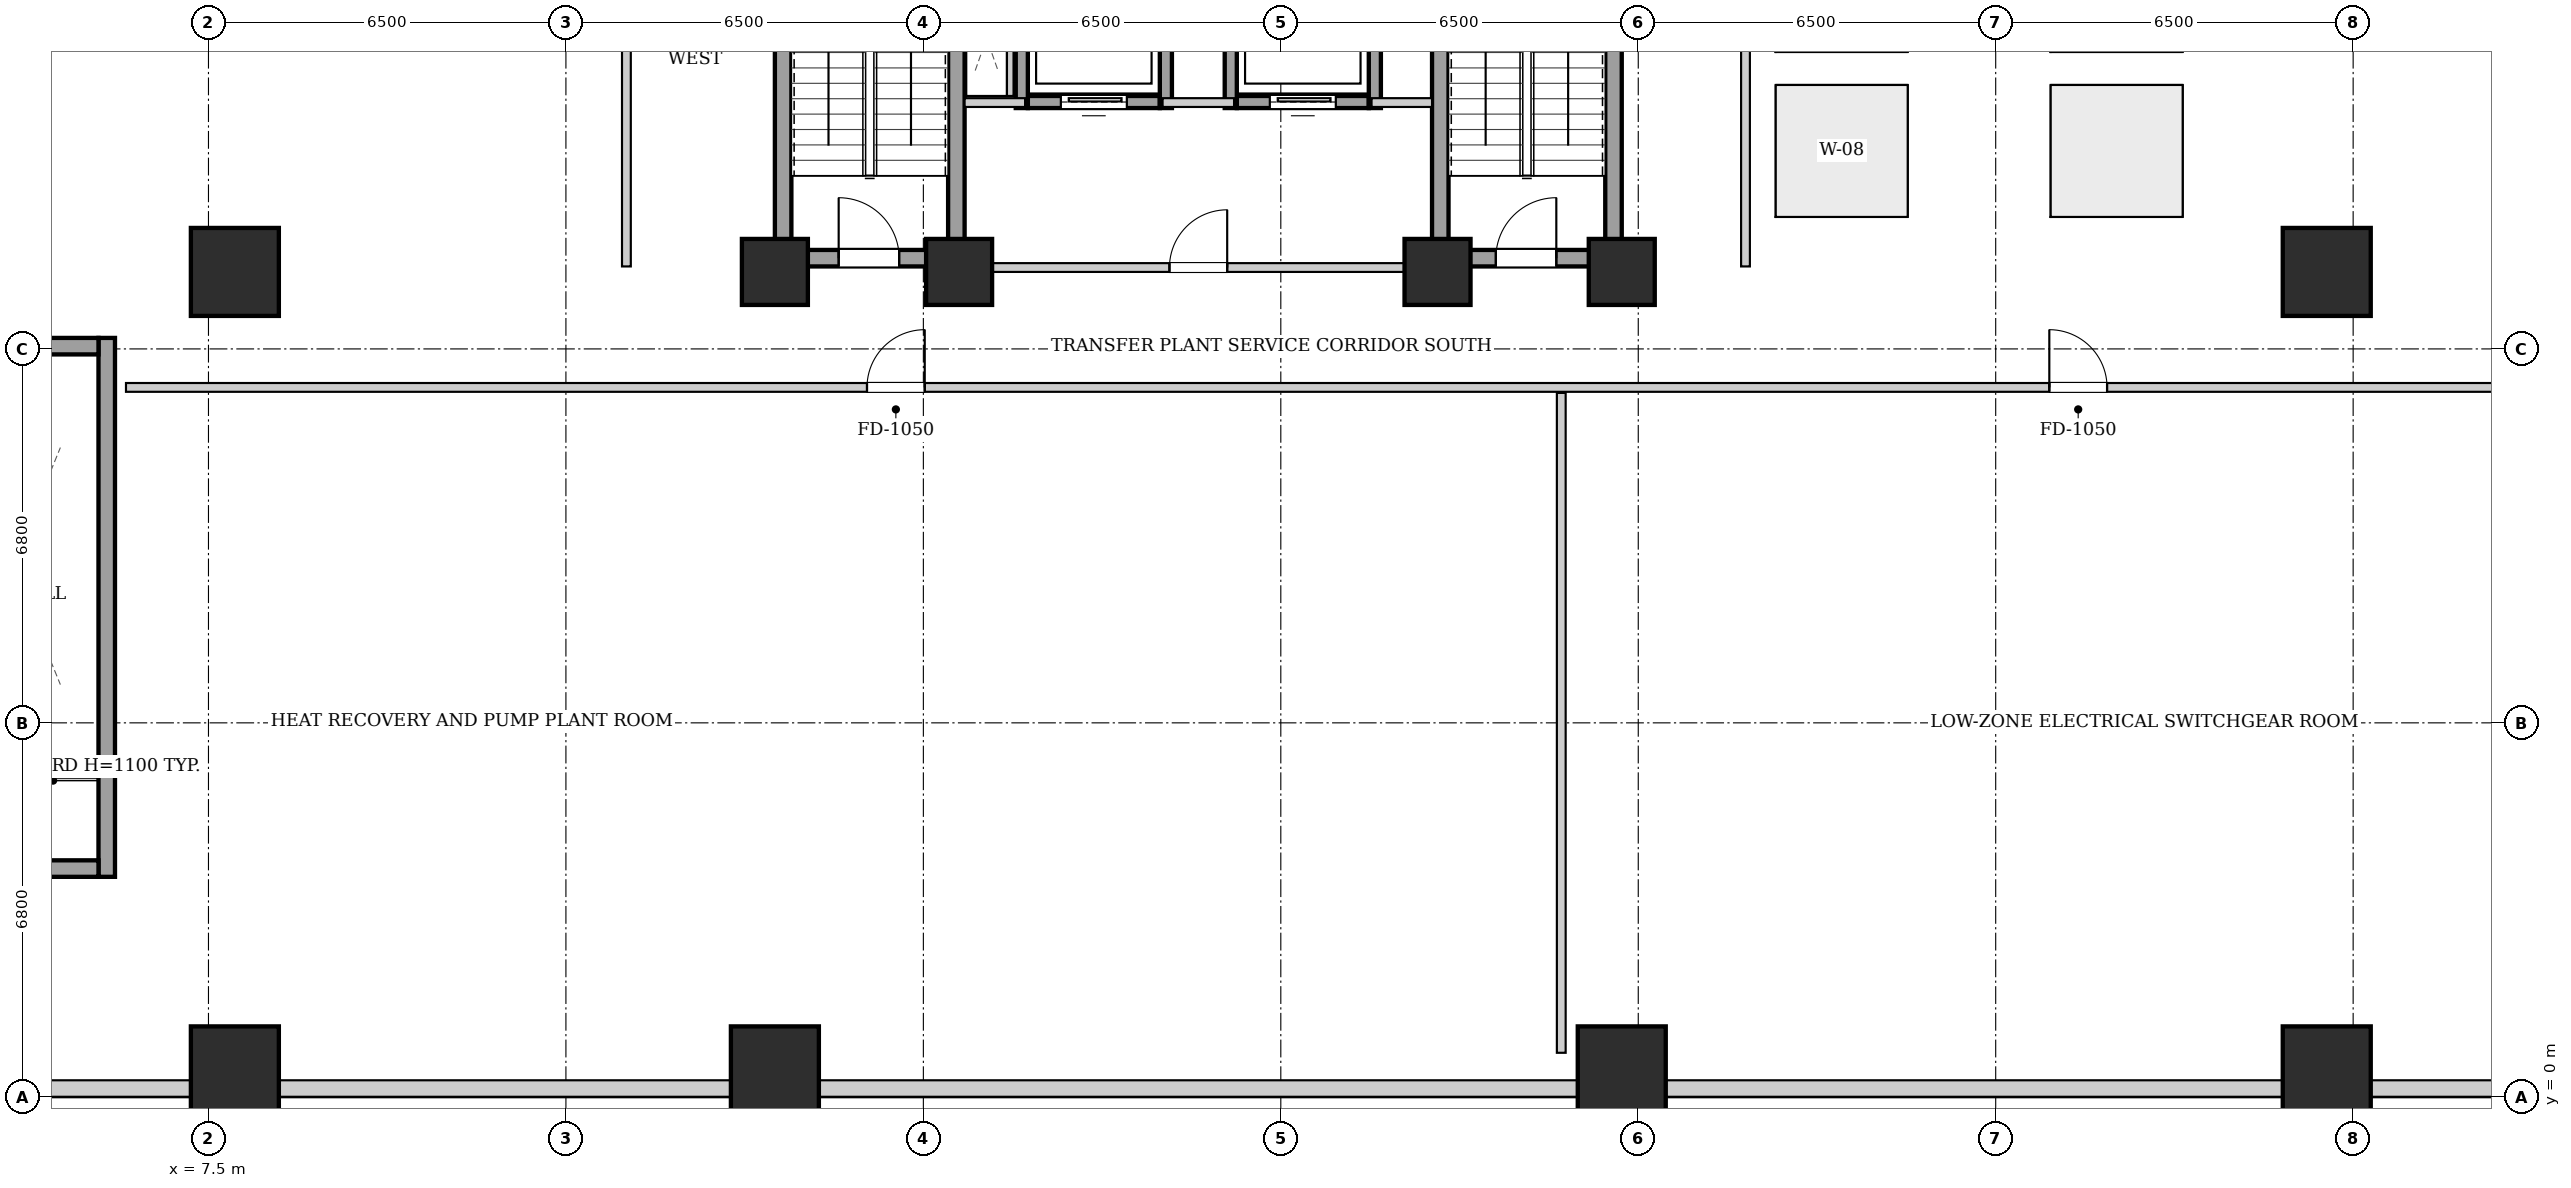
"""IFC4 building model, lengths in metres.
Left out: names, types, materials, properties, quantities, classifications, styles, units other than length and angle.
Written with IfcOpenShell. Run it as: python <this file> out.ifc"""

import sys

from ifc_helpers import new_model, si_unit, direction, frame, frame_2d, origin, origin_2d, place, context, subcontext, project, spatial, rectangle, extrude, element, fill, save


model = new_model("IFC4")
c1 = context("Model", 3, precision=1e-05, world=origin(), true_north=direction((0.0, 1.0)))
c2 = subcontext(c1, "Body", "Model", "MODEL_VIEW")
j1 = project(units=[si_unit("LENGTHUNIT", "METRE"), si_unit("PLANEANGLEUNIT", "RADIAN")], contexts=[c1])
p1 = place(None, origin())
s1 = spatial("IfcSite", under=j1, at=p1, CompositionType="ELEMENT")
p2 = place(p1, origin())
s2 = spatial("IfcBuilding", under=s1, at=p2, CompositionType="ELEMENT")
p3 = place(p2, frame((0.0, 0.0, 20.8)))
s3 = spatial("IfcBuildingStorey", under=s2, at=p3, CompositionType="ELEMENT", Elevation=20.8)
for number, where, z_axis, x_axis in (
    (1, (7.98, 0.48, 0.0), (0.0, 0.0, 1.0), (1.0, 0.0, 0.0)),
    (2, (7.98, 15.0, 0.0), (0.0, 0.0, 1.0), (1.0, 0.0, 0.0)),
    (3, (46.02, 0.48, 0.0), (0.0, 0.0, 1.0), (1.0, 0.0, 0.0)),
    (4, (46.02, 15.0, 0.0), (0.0, 0.0, 1.0), (1.0, 0.0, 0.0)),
    (5, (17.8, 0.48, 0.0), (0.0, 0.0, 1.0), (1.0, 0.0, 0.0)),
    (6, (33.2, 0.48, 0.0), (0.0, 0.0, 1.0), (1.0, 0.0, 0.0)),
):
    element("IfcColumn", number, at=place(p3, frame(where, z_axis=z_axis, x_axis=x_axis)), inside=s3, PredefinedType="COLUMN", context=c2, shape_type="SweptSolid", body=[
        extrude(rectangle(XDim=1.6, YDim=1.6, at=origin_2d()), origin(), (0.0, 0.0, 1.0), 5.0),
    ])
for number, where, z_axis, x_axis in (
    (7, (17.8, 15.0, 0.0), (0.0, 0.0, 1.0), (1.0, 0.0, 0.0)),
    (8, (21.15, 15.0, 0.0), (0.0, 0.0, 1.0), (1.0, 0.0, 0.0)),
    (9, (29.85, 15.0, 0.0), (0.0, 0.0, 1.0), (1.0, 0.0, 0.0)),
    (10, (33.2, 15.0, 0.0), (0.0, 0.0, 1.0), (1.0, 0.0, 0.0)),
):
    element("IfcColumn", number, at=place(p3, frame(where, z_axis=z_axis, x_axis=x_axis)), inside=s3, PredefinedType="COLUMN", context=c2, shape_type="SweptSolid", body=[
        extrude(rectangle(XDim=1.2, YDim=1.2, at=origin_2d()), origin(), (0.0, 0.0, 1.0), 5.0),
    ])
p4 = place(p3, frame((53.84, 0.15, 0.0), z_axis=(0.0, 0.0, 1.0), x_axis=(-1.0, 0.0, 0.0)))
e11 = element("IfcWall", 11, at=p4, inside=s3, PredefinedType="SOLIDWALL", context=c2, shape_type="SweptSolid", body=[
    extrude(rectangle(XDim=53.68, YDim=0.3, at=frame_2d((26.84, 0.0))), origin(), (0.0, 0.0, 1.0), 2.525),
])
for number, where, z_axis, x_axis in (
    (12, (17.95, 15.1, 0.0), (0.0, 0.0, 1.0), (0.0, 1.0, 0.0)),
    (13, (21.1, 15.1, 0.0), (0.0, 0.0, 1.0), (0.0, 1.0, 0.0)),
):
    element("IfcWall", number, at=place(p3, frame(where, z_axis=z_axis, x_axis=x_axis)), inside=s3, PredefinedType="SHEAR", context=c2, shape_type="SweptSolid", body=[
        extrude(rectangle(XDim=9.0, YDim=0.3, at=frame_2d((4.5, 0.0))), origin(), (0.0, 0.0, 1.0), 4.74),
    ])
p5 = place(p3, frame((18.1, 15.25, 0.0), z_axis=(0.0, 0.0, 1.0), x_axis=(1.0, 0.0, 0.0)))
e14 = element("IfcWall", 14, at=p5, inside=s3, PredefinedType="SHEAR", context=c2, shape_type="SweptSolid", body=[
    extrude(rectangle(XDim=2.85, YDim=0.3, at=frame_2d((1.425, 0.0))), origin(), (0.0, 0.0, 1.0), 4.74),
])
p6 = place(p5, frame((0.86, 0.0, 0.0)))
e15 = element("IfcOpeningElement", 15, at=p6, cuts=e14, PredefinedType="OPENING", context=c2, shape_type="SweptSolid", body=[
    extrude(rectangle(XDim=1.1, YDim=2.05, at=frame_2d((0.55, 1.025))), frame((0.0, 0.16, 0.0), z_axis=(0.0, -1.0, 0.0), x_axis=(1.0, 0.0, 0.0)), (0.0, 0.0, 1.0), 0.32),
])
for number, where, z_axis, x_axis in (
    (16, (29.9, 15.1, 0.0), (0.0, 0.0, 1.0), (0.0, 1.0, 0.0)),
    (17, (33.05, 15.1, 0.0), (0.0, 0.0, 1.0), (0.0, 1.0, 0.0)),
):
    element("IfcWall", number, at=place(p3, frame(where, z_axis=z_axis, x_axis=x_axis)), inside=s3, PredefinedType="SHEAR", context=c2, shape_type="SweptSolid", body=[
        extrude(rectangle(XDim=9.0, YDim=0.3, at=frame_2d((4.5, 0.0))), origin(), (0.0, 0.0, 1.0), 4.74),
    ])
p7 = place(p3, frame((30.05, 15.25, 0.0), z_axis=(0.0, 0.0, 1.0), x_axis=(1.0, 0.0, 0.0)))
e18 = element("IfcWall", 18, at=p7, inside=s3, PredefinedType="SHEAR", context=c2, shape_type="SweptSolid", body=[
    extrude(rectangle(XDim=2.85, YDim=0.3, at=frame_2d((1.425, 0.0))), origin(), (0.0, 0.0, 1.0), 4.74),
])
p8 = place(p7, frame((0.86, 0.0, 0.0)))
e19 = element("IfcOpeningElement", 19, at=p8, cuts=e18, PredefinedType="OPENING", context=c2, shape_type="SweptSolid", body=[
    extrude(rectangle(XDim=1.1, YDim=2.05, at=frame_2d((0.55, 1.025))), frame((0.0, 0.16, 0.0), z_axis=(0.0, -1.0, 0.0), x_axis=(1.0, 0.0, 0.0)), (0.0, 0.0, 1.0), 0.32),
])
p9 = place(p3, frame((5.65, 4.0, 0.0), z_axis=(0.0, 0.0, 1.0), x_axis=(0.0, 1.0, 0.0)))
e20 = element("IfcWall", 20, at=p9, inside=s3, PredefinedType="SHEAR", context=c2, shape_type="SweptSolid", body=[
    extrude(rectangle(XDim=9.8, YDim=0.3, at=frame_2d((4.9, 0.0))), origin(), (0.0, 0.0, 1.0), 4.74),
])
p10 = place(p3, frame((2.35, 13.65, 0.0), z_axis=(0.0, 0.0, 1.0), x_axis=(1.0, 0.0, 0.0)))
e21 = element("IfcWall", 21, at=p10, inside=s3, PredefinedType="SHEAR", context=c2, shape_type="SweptSolid", body=[
    extrude(rectangle(XDim=3.15, YDim=0.3, at=frame_2d((1.575, 0.0))), origin(), (0.0, 0.0, 1.0), 4.74),
])
p11 = place(p3, frame((2.35, 4.15, 0.0), z_axis=(0.0, 0.0, 1.0), x_axis=(1.0, 0.0, 0.0)))
e22 = element("IfcWall", 22, at=p11, inside=s3, PredefinedType="SHEAR", context=c2, shape_type="SweptSolid", body=[
    extrude(rectangle(XDim=3.15, YDim=0.3, at=frame_2d((1.575, 0.0))), origin(), (0.0, 0.0, 1.0), 4.74),
])
p12 = place(p11, frame((1.02, 0.0, 0.0)))
e23 = element("IfcOpeningElement", 23, at=p12, cuts=e22, PredefinedType="OPENING", context=c2, shape_type="SweptSolid", body=[
    extrude(rectangle(XDim=1.1, YDim=2.05, at=frame_2d((0.55, 1.025))), frame((0.0, 0.16, 0.0), z_axis=(0.0, -1.0, 0.0), x_axis=(1.0, 0.0, 0.0)), (0.0, 0.0, 1.0), 0.32),
])
p13 = place(p3, frame((22.4, 18.09, 0.0), z_axis=(0.0, 0.0, 1.0), x_axis=(1.0, 0.0, 0.0)))
e24 = element("IfcWall", 24, at=p13, inside=s3, PredefinedType="SHEAR", context=c2, shape_type="SweptSolid", body=[
    extrude(rectangle(XDim=2.4, YDim=0.22, at=frame_2d((1.2, 0.0))), origin(), (0.0, 0.0, 1.0), 4.74),
])
p14 = place(p13, frame((0.6, 0.0, 0.0)))
e25 = element("IfcOpeningElement", 25, at=p14, cuts=e24, PredefinedType="OPENING", context=c2, shape_type="SweptSolid", body=[
    extrude(rectangle(XDim=1.2, YDim=2.15, at=frame_2d((0.6, 1.075))), frame((0.0, 0.12, 0.0), z_axis=(0.0, -1.0, 0.0), x_axis=(1.0, 0.0, 0.0)), (0.0, 0.0, 1.0), 0.24),
])
for number, where, z_axis, x_axis in (
    (26, (22.29, 17.98, 0.0), (0.0, 0.0, 1.0), (0.0, 1.0, 0.0)),
    (27, (24.91, 17.98, 0.0), (0.0, 0.0, 1.0), (0.0, 1.0, 0.0)),
):
    element("IfcWall", number, at=place(p3, frame(where, z_axis=z_axis, x_axis=x_axis)), inside=s3, PredefinedType="SHEAR", context=c2, shape_type="SweptSolid", body=[
        extrude(rectangle(XDim=2.54, YDim=0.22, at=frame_2d((1.27, 0.0))), origin(), (0.0, 0.0, 1.0), 4.74),
    ])
p15 = place(p3, frame((26.2, 18.09, 0.0), z_axis=(0.0, 0.0, 1.0), x_axis=(1.0, 0.0, 0.0)))
e28 = element("IfcWall", 28, at=p15, inside=s3, PredefinedType="SHEAR", context=c2, shape_type="SweptSolid", body=[
    extrude(rectangle(XDim=2.4, YDim=0.22, at=frame_2d((1.2, 0.0))), origin(), (0.0, 0.0, 1.0), 4.74),
])
p16 = place(p15, frame((0.6, 0.0, 0.0)))
e29 = element("IfcOpeningElement", 29, at=p16, cuts=e28, PredefinedType="OPENING", context=c2, shape_type="SweptSolid", body=[
    extrude(rectangle(XDim=1.2, YDim=2.15, at=frame_2d((0.6, 1.075))), frame((0.0, 0.12, 0.0), z_axis=(0.0, -1.0, 0.0), x_axis=(1.0, 0.0, 0.0)), (0.0, 0.0, 1.0), 0.24),
])
for number, where, z_axis, x_axis in (
    (30, (26.09, 17.98, 0.0), (0.0, 0.0, 1.0), (0.0, 1.0, 0.0)),
    (31, (28.71, 17.98, 0.0), (0.0, 0.0, 1.0), (0.0, 1.0, 0.0)),
):
    element("IfcWall", number, at=place(p3, frame(where, z_axis=z_axis, x_axis=x_axis)), inside=s3, PredefinedType="SHEAR", context=c2, shape_type="SweptSolid", body=[
        extrude(rectangle(XDim=2.54, YDim=0.22, at=frame_2d((1.27, 0.0))), origin(), (0.0, 0.0, 1.0), 4.74),
    ])
p17 = place(p3, frame((21.25, 15.08, 0.0), z_axis=(0.0, 0.0, 1.0), x_axis=(1.0, 0.0, 0.0)))
e32 = element("IfcWall", 32, at=p17, inside=s3, PredefinedType="PARTITIONING", context=c2, shape_type="SweptSolid", body=[
    extrude(rectangle(XDim=8.5, YDim=0.16, at=frame_2d((4.25, 0.0))), origin(), (0.0, 0.0, 1.0), 4.74),
])
p18 = place(p17, frame((3.725, 0.0, 0.0)))
e33 = element("IfcOpeningElement", 33, at=p18, cuts=e32, PredefinedType="OPENING", context=c2, shape_type="SweptSolid", body=[
    extrude(rectangle(XDim=1.05, YDim=2.05, at=frame_2d((0.525, 1.025))), frame((0.0, 0.09, 0.0), z_axis=(0.0, -1.0, 0.0), x_axis=(1.0, 0.0, 0.0)), (0.0, 0.0, 1.0), 0.18),
])
p19 = place(p3, frame((21.25, 18.08, 0.0), z_axis=(0.0, 0.0, 1.0), x_axis=(1.0, 0.0, 0.0)))
e34 = element("IfcWall", 34, at=p19, inside=s3, PredefinedType="PARTITIONING", context=c2, shape_type="SweptSolid", body=[
    extrude(rectangle(XDim=1.1, YDim=0.16, at=frame_2d((0.55, 0.0))), origin(), (0.0, 0.0, 1.0), 4.74),
])
p20 = place(p3, frame((24.85, 18.08, 0.0), z_axis=(0.0, 0.0, 1.0), x_axis=(1.0, 0.0, 0.0)))
e35 = element("IfcWall", 35, at=p20, inside=s3, PredefinedType="PARTITIONING", context=c2, shape_type="SweptSolid", body=[
    extrude(rectangle(XDim=1.3, YDim=0.16, at=frame_2d((0.65, 0.0))), origin(), (0.0, 0.0, 1.0), 4.74),
])
p21 = place(p3, frame((28.65, 18.08, 0.0), z_axis=(0.0, 0.0, 1.0), x_axis=(1.0, 0.0, 0.0)))
e36 = element("IfcWall", 36, at=p21, inside=s3, PredefinedType="PARTITIONING", context=c2, shape_type="SweptSolid", body=[
    extrude(rectangle(XDim=1.1, YDim=0.16, at=frame_2d((0.55, 0.0))), origin(), (0.0, 0.0, 1.0), 4.74),
])
p22 = place(p3, frame((22.08, 18.2, 0.0), z_axis=(0.0, 0.0, 1.0), x_axis=(0.0, 1.0, 0.0)))
e37 = element("IfcWall", 37, at=p22, inside=s3, PredefinedType="PARTITIONING", context=c2, shape_type="SweptSolid", body=[
    extrude(rectangle(XDim=2.12, YDim=0.12, at=frame_2d((1.06, 0.0))), origin(), (0.0, 0.0, 1.0), 4.74),
])
p23 = place(p3, frame((6.0, 12.9, 0.0), z_axis=(0.0, 0.0, 1.0), x_axis=(1.0, 0.0, 0.0)))
e38 = element("IfcWall", 38, at=p23, inside=s3, PredefinedType="PARTITIONING", context=c2, shape_type="SweptSolid", body=[
    extrude(rectangle(XDim=47.2, YDim=0.16, at=frame_2d((23.6, 0.0))), origin(), (0.0, 0.0, 1.0), 4.74),
])
p24 = place(p23, frame((13.475, 0.0, 0.0)))
e39 = element("IfcOpeningElement", 39, at=p24, cuts=e38, PredefinedType="OPENING", context=c2, shape_type="SweptSolid", body=[
    extrude(rectangle(XDim=1.05, YDim=2.05, at=frame_2d((0.525, 1.025))), frame((0.0, 0.09, 0.0), z_axis=(0.0, -1.0, 0.0), x_axis=(1.0, 0.0, 0.0)), (0.0, 0.0, 1.0), 0.18),
])
p25 = place(p23, frame((34.975, 0.0, 0.0)))
e40 = element("IfcOpeningElement", 40, at=p25, cuts=e38, PredefinedType="OPENING", context=c2, shape_type="SweptSolid", body=[
    extrude(rectangle(XDim=1.05, YDim=2.05, at=frame_2d((0.525, 1.025))), frame((0.0, 0.09, 0.0), z_axis=(0.0, -1.0, 0.0), x_axis=(1.0, 0.0, 0.0)), (0.0, 0.0, 1.0), 0.18),
])
p26 = place(p3, frame((32.1, 0.8, 0.0), z_axis=(0.0, 0.0, 1.0), x_axis=(0.0, 1.0, 0.0)))
e41 = element("IfcWall", 41, at=p26, inside=s3, PredefinedType="PARTITIONING", context=c2, shape_type="SweptSolid", body=[
    extrude(rectangle(XDim=12.0, YDim=0.16, at=frame_2d((6.0, 0.0))), origin(), (0.0, 0.0, 1.0), 4.74),
])
p27 = place(p3, frame((15.1, 15.1, 0.0), z_axis=(0.0, 0.0, 1.0), x_axis=(0.0, 1.0, 0.0)))
e42 = element("IfcWall", 42, at=p27, inside=s3, PredefinedType="PARTITIONING", context=c2, shape_type="SweptSolid", body=[
    extrude(rectangle(XDim=13.8, YDim=0.16, at=frame_2d((6.9, 0.0))), origin(), (0.0, 0.0, 1.0), 4.74),
])
p28 = place(p27, frame((6.475, 0.0, 0.0)))
e43 = element("IfcOpeningElement", 43, at=p28, cuts=e42, PredefinedType="OPENING", context=c2, shape_type="SweptSolid", body=[
    extrude(rectangle(XDim=1.05, YDim=2.05, at=frame_2d((0.525, 1.025))), frame((0.0, 0.09, 0.0), z_axis=(0.0, -1.0, 0.0), x_axis=(1.0, 0.0, 0.0)), (0.0, 0.0, 1.0), 0.18),
])
p29 = place(p3, frame((35.45, 15.1, 0.0), z_axis=(0.0, 0.0, 1.0), x_axis=(0.0, 1.0, 0.0)))
e44 = element("IfcWall", 44, at=p29, inside=s3, PredefinedType="PARTITIONING", context=c2, shape_type="SweptSolid", body=[
    extrude(rectangle(XDim=13.8, YDim=0.16, at=frame_2d((6.9, 0.0))), origin(), (0.0, 0.0, 1.0), 4.74),
])
p30 = place(p29, frame((6.475, 0.0, 0.0)))
e45 = element("IfcOpeningElement", 45, at=p30, cuts=e44, PredefinedType="OPENING", context=c2, shape_type="SweptSolid", body=[
    extrude(rectangle(XDim=1.05, YDim=2.05, at=frame_2d((0.525, 1.025))), frame((0.0, 0.09, 0.0), z_axis=(0.0, -1.0, 0.0), x_axis=(1.0, 0.0, 0.0)), (0.0, 0.0, 1.0), 0.18),
])
p31 = place(p3, frame((0.0, 0.0, -0.45)))
p32 = place(p31, frame((37.2, 17.2, 0.4)))
e46 = element("IfcWindow", 46, at=p32, inside=s3, PartitioningType="SINGLE_PANEL", PredefinedType="SKYLIGHT", context=c2, shape_type="SweptSolid", body=[
    extrude(rectangle(XDim=2.4, YDim=2.4, at=origin_2d()), origin(), (0.0, 0.0, 1.0), 0.05),
])
p33 = place(p31, frame((42.2, 17.2, 0.4)))
e47 = element("IfcWindow", 47, at=p33, inside=s3, PartitioningType="SINGLE_PANEL", PredefinedType="SKYLIGHT", context=c2, shape_type="SweptSolid", body=[
    extrude(rectangle(XDim=2.4, YDim=2.4, at=origin_2d()), origin(), (0.0, 0.0, 1.0), 0.05),
])
p34 = place(p6, origin())
e48 = element("IfcDoor", 48, at=p34, inside=s3, OperationType="SINGLE_SWING_LEFT", PredefinedType="DOOR", context=c2, shape_type="SweptSolid", body=[
    extrude(rectangle(XDim=1.1, YDim=2.05, at=frame_2d((0.55, 1.025))), frame((0.0, 0.025, 0.0), z_axis=(0.0, -1.0, 0.0), x_axis=(1.0, 0.0, 0.0)), (0.0, 0.0, 1.0), 0.05),
])
fill(e15, e48)
p35 = place(p8, origin())
e49 = element("IfcDoor", 49, at=p35, inside=s3, OperationType="SINGLE_SWING_RIGHT", PredefinedType="DOOR", context=c2, shape_type="SweptSolid", body=[
    extrude(rectangle(XDim=1.1, YDim=2.05, at=frame_2d((0.55, 1.025))), frame((0.0, 0.025, 0.0), z_axis=(0.0, -1.0, 0.0), x_axis=(1.0, 0.0, 0.0)), (0.0, 0.0, 1.0), 0.05),
])
fill(e19, e49)
p36 = place(p14, origin())
e50 = element("IfcDoor", 50, at=p36, inside=s3, OperationType="SLIDING_TO_LEFT", PredefinedType="DOOR", context=c2, shape_type="SweptSolid", body=[
    extrude(rectangle(XDim=1.2, YDim=2.15, at=frame_2d((0.6, 1.075))), frame((0.0, 0.025, 0.0), z_axis=(0.0, -1.0, 0.0), x_axis=(1.0, 0.0, 0.0)), (0.0, 0.0, 1.0), 0.05),
])
fill(e25, e50)
p37 = place(p16, origin())
e51 = element("IfcDoor", 51, at=p37, inside=s3, OperationType="SLIDING_TO_LEFT", PredefinedType="DOOR", context=c2, shape_type="SweptSolid", body=[
    extrude(rectangle(XDim=1.2, YDim=2.15, at=frame_2d((0.6, 1.075))), frame((0.0, 0.025, 0.0), z_axis=(0.0, -1.0, 0.0), x_axis=(1.0, 0.0, 0.0)), (0.0, 0.0, 1.0), 0.05),
])
fill(e29, e51)
p38 = place(p18, origin())
e52 = element("IfcDoor", 52, at=p38, inside=s3, OperationType="SINGLE_SWING_RIGHT", PredefinedType="DOOR", context=c2, shape_type="SweptSolid", body=[
    extrude(rectangle(XDim=1.05, YDim=2.05, at=frame_2d((0.525, 1.025))), frame((0.0, 0.025, 0.0), z_axis=(0.0, -1.0, 0.0), x_axis=(1.0, 0.0, 0.0)), (0.0, 0.0, 1.0), 0.05),
])
fill(e33, e52)
p39 = place(p24, origin())
e53 = element("IfcDoor", 53, at=p39, inside=s3, OperationType="SINGLE_SWING_RIGHT", PredefinedType="DOOR", context=c2, shape_type="SweptSolid", body=[
    extrude(rectangle(XDim=1.05, YDim=2.05, at=frame_2d((0.525, 1.025))), frame((0.0, 0.025, 0.0), z_axis=(0.0, -1.0, 0.0), x_axis=(1.0, 0.0, 0.0)), (0.0, 0.0, 1.0), 0.05),
])
fill(e39, e53)
p40 = place(p25, origin())
e54 = element("IfcDoor", 54, at=p40, inside=s3, OperationType="SINGLE_SWING_LEFT", PredefinedType="DOOR", context=c2, shape_type="SweptSolid", body=[
    extrude(rectangle(XDim=1.05, YDim=2.05, at=frame_2d((0.525, 1.025))), frame((0.0, 0.025, 0.0), z_axis=(0.0, -1.0, 0.0), x_axis=(1.0, 0.0, 0.0)), (0.0, 0.0, 1.0), 0.05),
])
fill(e40, e54)
save(model, sys.argv[1])
